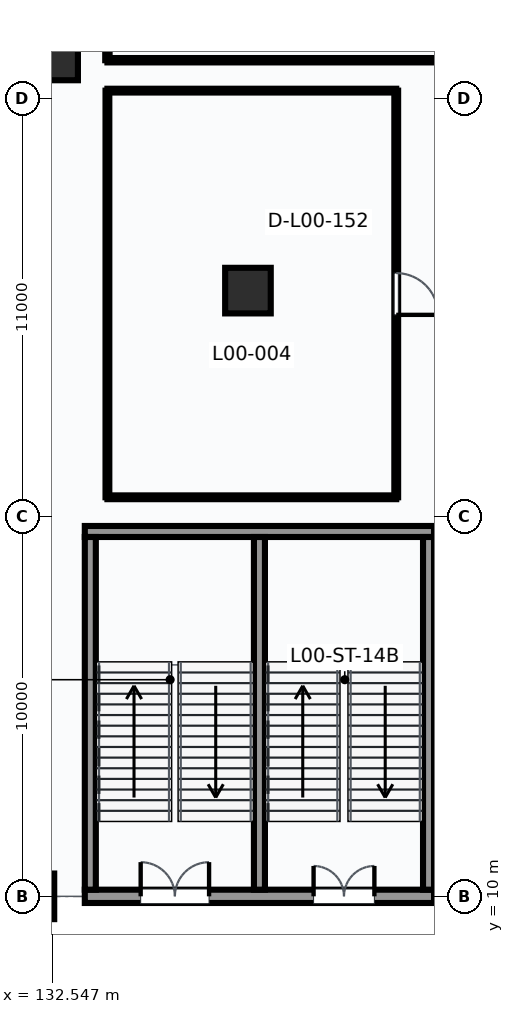
"""IFC4 building model, lengths in metres.
Left out: names, types, materials, properties, quantities, classifications, styles, units other than length and angle.
Written with IfcOpenShell. Run it as: python <this file> out.ifc"""

import sys

from ifc_helpers import new_model, si_unit, direction, frame, frame_2d, origin, origin_2d, place, context, subcontext, project, spatial, rectangle, extrude, element, fill, save


model = new_model("IFC4")
c1 = context("Model", 3, precision=1e-05, world=origin(), true_north=direction((0.0, 1.0)))
c2 = subcontext(c1, "Body", "Model", "MODEL_VIEW")
j1 = project(units=[si_unit("LENGTHUNIT", "METRE"), si_unit("PLANEANGLEUNIT", "RADIAN")], contexts=[c1])
p1 = place(None, origin())
s1 = spatial("IfcSite", under=j1, at=p1, CompositionType="ELEMENT")
p2 = place(p1, origin())
s2 = spatial("IfcBuilding", under=s1, at=p2, CompositionType="ELEMENT")
p3 = place(p2, origin())
s3 = spatial("IfcBuildingStorey", under=s2, at=p3, CompositionType="ELEMENT", Elevation=0.0)
p4 = place(p3, frame((132.0, 10.0, 0.0), z_axis=(0.0, 0.0, 1.0), x_axis=(1.0, 0.0, 0.0)))
e1 = element("IfcColumn", 1, at=p4, inside=s3, PredefinedType="COLUMN", context=c2, shape_type="SweptSolid", body=[
    extrude(rectangle(XDim=1.2, YDim=1.2, at=origin_2d()), origin(), (0.0, 0.0, 1.0), 5.4),
])
p5 = place(p3, frame((132.749, 31.948, 0.0), z_axis=(0.0, 0.0, 1.0), x_axis=(1.0, 0.0, 0.0)))
e2 = element("IfcColumn", 2, at=p5, inside=s3, PredefinedType="COLUMN", context=c2, shape_type="SweptSolid", body=[
    extrude(rectangle(XDim=0.95, YDim=0.95, at=origin_2d()), origin(), (0.0, 0.0, 1.0), 5.4),
])
p6 = place(p3, frame((137.698, 25.938, 0.0), z_axis=(0.0, 0.0, 1.0), x_axis=(1.0, 0.0, 0.0)))
e3 = element("IfcColumn", 3, at=p6, inside=s3, PredefinedType="COLUMN", context=c2, shape_type="SweptSolid", body=[
    extrude(rectangle(XDim=1.2, YDim=1.2, at=origin_2d()), origin(), (0.0, 0.0, 1.0), 5.4),
])
p7 = place(p3, frame((133.405, 10.0, 0.0), z_axis=(0.0, 0.0, 1.0), x_axis=(1.0, 0.0, 0.0)))
e4 = element("IfcWall", 4, at=p7, inside=s3, PredefinedType="SHEAR", context=c2, shape_type="SweptSolid", body=[
    extrude(rectangle(XDim=9.19, YDim=0.35, at=frame_2d((4.595, 0.0))), origin(), (0.0, 0.0, 1.0), 4.347),
])
p8 = place(p7, frame((1.47, 0.0, 0.0)))
e5 = element("IfcOpeningElement", 5, at=p8, cuts=e4, PredefinedType="OPENING", context=c2, shape_type="SweptSolid", body=[
    extrude(rectangle(XDim=1.8, YDim=2.2, at=frame_2d((0.9, 1.1))), frame((0.0, 0.185, 0.0), z_axis=(0.0, -1.0, 0.0), x_axis=(1.0, 0.0, 0.0)), (0.0, 0.0, 1.0), 0.37),
])
p9 = place(p7, frame((6.02, 0.0, 0.0)))
e6 = element("IfcOpeningElement", 6, at=p9, cuts=e4, PredefinedType="OPENING", context=c2, shape_type="SweptSolid", body=[
    extrude(rectangle(XDim=1.6, YDim=2.2, at=frame_2d((0.8, 1.1))), frame((0.0, 0.185, 0.0), z_axis=(0.0, -1.0, 0.0), x_axis=(1.0, 0.0, 0.0)), (0.0, 0.0, 1.0), 0.37),
])
p10 = place(p3, frame((133.405, 19.6, 0.0), z_axis=(0.0, 0.0, 1.0), x_axis=(1.0, 0.0, 0.0)))
e7 = element("IfcWall", 7, at=p10, inside=s3, PredefinedType="SHEAR", context=c2, shape_type="SweptSolid", body=[
    extrude(rectangle(XDim=9.19, YDim=0.29, at=frame_2d((4.595, 0.0))), origin(), (0.0, 0.0, 1.0), 5.4),
])
for number, where, z_axis, x_axis in (
    (8, (133.55, 10.175, 0.0), (0.0, 0.0, 1.0), (0.0, 1.0, 0.0)),
    (9, (142.45, 10.175, 0.0), (0.0, 0.0, 1.0), (0.0, 1.0, 0.0)),
    (10, (138.0, 10.175, 0.0), (0.0, 0.0, 1.0), (0.0, 1.0, 0.0)),
):
    element("IfcWall", number, at=place(p3, frame(where, z_axis=z_axis, x_axis=x_axis)), inside=s3, PredefinedType="SHEAR", context=c2, shape_type="SweptSolid", body=[
        extrude(rectangle(XDim=9.28, YDim=0.29, at=frame_2d((4.64, 0.0))), origin(), (0.0, 0.0, 1.0), 5.4),
    ])
p11 = place(p3, frame((155.4, 32.0, 0.0), z_axis=(0.0, 0.0, 1.0), x_axis=(-1.0, 0.0, 0.0)))
e11 = element("IfcWall", 11, at=p11, inside=s3, PredefinedType="PARTITIONING", context=c2, shape_type="SweptSolid", body=[
    extrude(rectangle(XDim=21.4, YDim=0.115, at=frame_2d((10.7, 0.0))), origin(), (0.0, 0.0, 1.0), 4.04),
])
p12 = place(p11, frame((7.582, 0.0, 0.0)))
e12 = element("IfcOpeningElement", 12, at=p12, cuts=e11, PredefinedType="OPENING", context=c2, shape_type="SweptSolid", body=[
    extrude(rectangle(XDim=1.1, YDim=2.2, at=frame_2d((0.55, 1.1))), frame((0.0, 0.067, 0.0), z_axis=(0.0, -1.0, 0.0), x_axis=(1.0, 0.0, 0.0)), (0.0, 0.0, 1.0), 0.135),
])
p13 = place(p3, frame((134.0, 32.0, 0.0), z_axis=(0.0, 0.0, 1.0), x_axis=(0.0, 1.0, 0.0)))
e13 = element("IfcWall", 13, at=p13, inside=s3, PredefinedType="PARTITIONING", context=c2, shape_type="SweptSolid", body=[
    extrude(rectangle(XDim=19.5, YDim=0.115, at=frame_2d((9.75, 0.0))), origin(), (0.0, 0.0, 1.0), 5.06),
])
p14 = place(p3, frame((141.6, 31.2, 0.0), z_axis=(0.0, 0.0, 1.0), x_axis=(0.0, -1.0, 0.0)))
e14 = element("IfcWall", 14, at=p14, inside=s3, PredefinedType="PARTITIONING", context=c2, shape_type="SweptSolid", body=[
    extrude(rectangle(XDim=10.7, YDim=0.1, at=frame_2d((5.35, 0.0))), origin(), (0.0, 0.0, 1.0), 5.06),
])
p15 = place(p14, frame((4.8, 0.0, 0.0)))
e15 = element("IfcOpeningElement", 15, at=p15, cuts=e14, PredefinedType="OPENING", context=c2, shape_type="SweptSolid", body=[
    extrude(rectangle(XDim=1.1, YDim=2.2, at=frame_2d((0.55, 1.1))), frame((0.0, 0.06, 0.0), z_axis=(0.0, -1.0, 0.0), x_axis=(1.0, 0.0, 0.0)), (0.0, 0.0, 1.0), 0.12),
])
p16 = place(p3, frame((141.6, 20.5, 0.0), z_axis=(0.0, 0.0, 1.0), x_axis=(-1.0, 0.0, 0.0)))
e16 = element("IfcWall", 16, at=p16, inside=s3, PredefinedType="PARTITIONING", context=c2, shape_type="SweptSolid", body=[
    extrude(rectangle(XDim=7.6, YDim=0.1, at=frame_2d((3.8, 0.0))), origin(), (0.0, 0.0, 1.0), 5.06),
])
p17 = place(p3, frame((134.0, 20.5, 0.0), z_axis=(0.0, 0.0, 1.0), x_axis=(0.0, 1.0, 0.0)))
e17 = element("IfcWall", 17, at=p17, inside=s3, PredefinedType="PARTITIONING", context=c2, shape_type="SweptSolid", body=[
    extrude(rectangle(XDim=10.7, YDim=0.1, at=frame_2d((5.35, 0.0))), origin(), (0.0, 0.0, 1.0), 5.06),
])
p18 = place(p3, frame((134.0, 31.2, 0.0), z_axis=(0.0, 0.0, 1.0), x_axis=(1.0, 0.0, 0.0)))
e18 = element("IfcWall", 18, at=p18, inside=s3, PredefinedType="PARTITIONING", context=c2, shape_type="SweptSolid", body=[
    extrude(rectangle(XDim=7.6, YDim=0.1, at=frame_2d((3.8, 0.0))), origin(), (0.0, 0.0, 1.0), 5.06),
])
p19 = place(p8, frame((1.8, 0.0, 0.0), z_axis=(0.0, 0.0, 1.0), x_axis=(-1.0, 0.0, 0.0)))
e19 = element("IfcDoor", 19, at=p19, inside=s3, OperationType="DOUBLE_DOOR_SINGLE_SWING", PredefinedType="DOOR", context=c2, shape_type="SweptSolid", body=[
    extrude(rectangle(XDim=1.8, YDim=2.2, at=frame_2d((0.9, 1.1))), frame((0.0, 0.025, 0.0), z_axis=(0.0, -1.0, 0.0), x_axis=(1.0, 0.0, 0.0)), (0.0, 0.0, 1.0), 0.05),
])
fill(e5, e19)
p20 = place(p9, frame((1.6, 0.0, 0.0), z_axis=(0.0, 0.0, 1.0), x_axis=(-1.0, 0.0, 0.0)))
e20 = element("IfcDoor", 20, at=p20, inside=s3, OperationType="DOUBLE_DOOR_SINGLE_SWING", PredefinedType="DOOR", context=c2, shape_type="SweptSolid", body=[
    extrude(rectangle(XDim=1.6, YDim=2.2, at=frame_2d((0.8, 1.1))), frame((0.0, 0.025, 0.0), z_axis=(0.0, -1.0, 0.0), x_axis=(1.0, 0.0, 0.0)), (0.0, 0.0, 1.0), 0.05),
])
fill(e6, e20)
p21 = place(p15, origin())
e21 = element("IfcDoor", 21, at=p21, inside=s3, OperationType="SINGLE_SWING_RIGHT", PredefinedType="DOOR", context=c2, shape_type="SweptSolid", body=[
    extrude(rectangle(XDim=1.1, YDim=2.2, at=frame_2d((0.55, 1.1))), frame((0.0, 0.025, 0.0), z_axis=(0.0, -1.0, 0.0), x_axis=(1.0, 0.0, 0.0)), (0.0, 0.0, 1.0), 0.05),
])
fill(e15, e21)
save(model, sys.argv[1])
